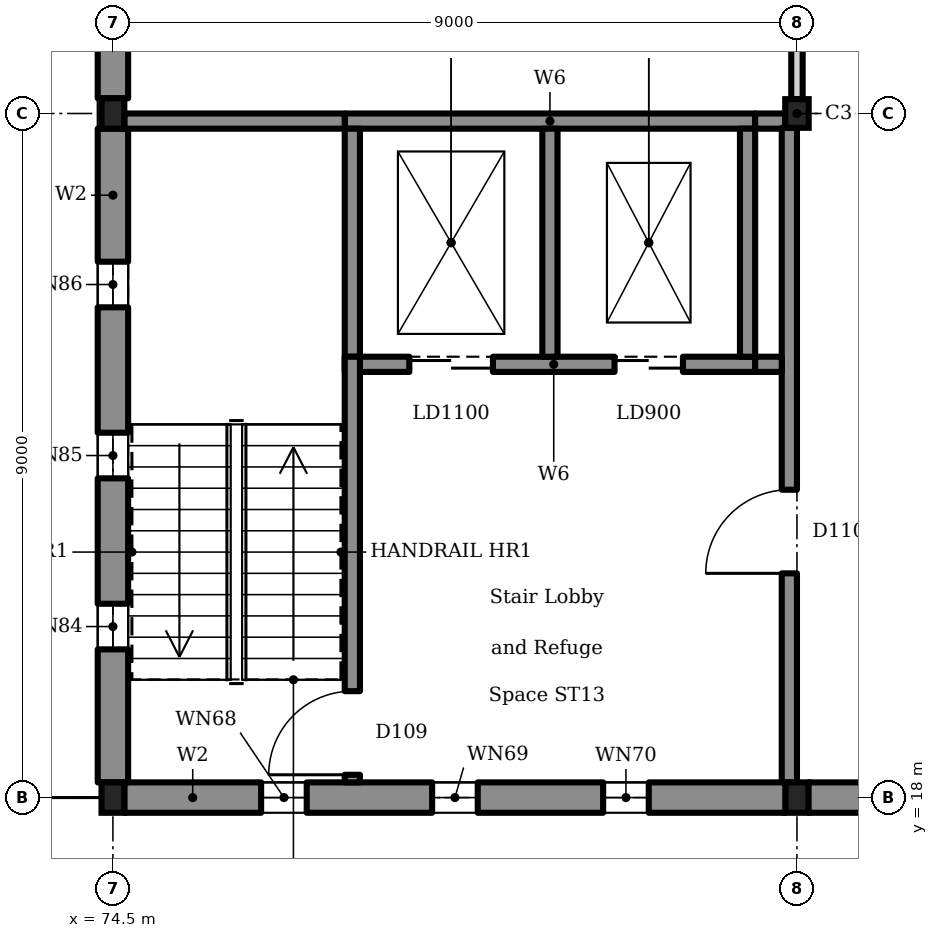
"""IFC4 building model, lengths in metres.
Left out: names, types, materials, properties, quantities, classifications, styles, units other than length and angle.
Written with IfcOpenShell. Run it as: python <this file> out.ifc"""

import sys

from ifc_helpers import new_model, si_unit, direction, frame, frame_2d, origin, origin_2d, place, context, subcontext, project, spatial, rectangle, i_section, extrude, element, fill, save


model = new_model("IFC4")
c1 = context("Model", 3, precision=1e-05, world=origin(), true_north=direction((0.0, 1.0)))
c2 = subcontext(c1, "Body", "Model", "MODEL_VIEW")
j1 = project(units=[si_unit("LENGTHUNIT", "METRE"), si_unit("PLANEANGLEUNIT", "RADIAN")], contexts=[c1])
p1 = place(None, origin())
s1 = spatial("IfcSite", under=j1, at=p1, CompositionType="ELEMENT")
p2 = place(p1, origin())
s2 = spatial("IfcBuilding", under=s1, at=p2, CompositionType="ELEMENT")
p3 = place(p2, frame((0.0, 0.0, 9.9)))
s3 = spatial("IfcBuildingStorey", under=s2, at=p3, CompositionType="ELEMENT", Elevation=9.9)
for number, where, z_axis, x_axis in (
    (1, (74.5, 18.0, 0.0), (0.0, 0.0, 1.0), (1.0, 0.0, 0.0)),
    (2, (83.5, 18.0, 0.0), (0.0, 0.0, 1.0), (1.0, 0.0, 0.0)),
    (3, (74.5, 27.0, 0.0), (0.0, 0.0, 1.0), (1.0, 0.0, 0.0)),
):
    element("IfcColumn", number, at=place(p3, frame(where, z_axis=z_axis, x_axis=x_axis)), inside=s3, PredefinedType="COLUMN", context=c2, shape_type="SweptSolid", body=[
        extrude(i_section(OverallWidth=0.3, OverallDepth=0.4, WebThickness=0.013, FlangeThickness=0.024, FilletRadius=0.027, at=origin_2d()), origin(), (0.0, 0.0, 1.0), 4.5),
    ])
p4 = place(p3, frame((83.5, 27.0, 0.0), z_axis=(0.0, 0.0, 1.0), x_axis=(1.0, 0.0, 0.0)))
e4 = element("IfcColumn", 4, at=p4, inside=s3, PredefinedType="COLUMN", context=c2, shape_type="SweptSolid", body=[
    extrude(i_section(OverallWidth=0.309, OverallDepth=0.377, WebThickness=0.021, FlangeThickness=0.04, FilletRadius=0.027, at=origin_2d()), origin(), (0.0, 0.0, 1.0), 4.5),
])
p5 = place(p3, frame((77.55, 23.7, 0.0), z_axis=(0.0, 0.0, 1.0), x_axis=(1.0, 0.0, 0.0)))
e5 = element("IfcWall", 5, at=p5, inside=s3, PredefinedType="SOLIDWALL", context=c2, shape_type="SweptSolid", body=[
    extrude(rectangle(XDim=5.4, YDim=0.2, at=frame_2d((2.7, 0.0))), origin(), (0.0, 0.0, 1.0), 4.25),
])
p6 = place(p5, frame((0.85, 0.0, 0.0)))
e6 = element("IfcOpeningElement", 6, at=p6, cuts=e5, PredefinedType="OPENING", context=c2, shape_type="SweptSolid", body=[
    extrude(rectangle(XDim=1.1, YDim=2.1, at=frame_2d((0.55, 1.05))), frame((0.0, 0.11, 0.0), z_axis=(0.0, -1.0, 0.0), x_axis=(1.0, 0.0, 0.0)), (0.0, 0.0, 1.0), 0.22),
])
p7 = place(p5, frame((3.55, 0.0, 0.0)))
e7 = element("IfcOpeningElement", 7, at=p7, cuts=e5, PredefinedType="OPENING", context=c2, shape_type="SweptSolid", body=[
    extrude(rectangle(XDim=0.9, YDim=2.1, at=frame_2d((0.45, 1.05))), frame((0.0, 0.11, 0.0), z_axis=(0.0, -1.0, 0.0), x_axis=(1.0, 0.0, 0.0)), (0.0, 0.0, 1.0), 0.22),
])
p8 = place(p3, frame((77.55, 26.9, 0.0), z_axis=(0.0, 0.0, 1.0), x_axis=(1.0, 0.0, 0.0)))
e8 = element("IfcWall", 8, at=p8, inside=s3, PredefinedType="SOLIDWALL", context=c2, shape_type="SweptSolid", body=[
    extrude(rectangle(XDim=5.4, YDim=0.2, at=frame_2d((2.7, 0.0))), origin(), (0.0, 0.0, 1.0), 4.25),
])
for number, where, z_axis, x_axis in (
    (9, (77.65, 23.8, 0.0), (0.0, 0.0, 1.0), (0.0, 1.0, 0.0)),
    (10, (80.25, 23.8, 0.0), (0.0, 0.0, 1.0), (0.0, 1.0, 0.0)),
    (11, (82.85, 23.8, 0.0), (0.0, 0.0, 1.0), (0.0, 1.0, 0.0)),
):
    element("IfcWall", number, at=place(p3, frame(where, z_axis=z_axis, x_axis=x_axis)), inside=s3, PredefinedType="SOLIDWALL", context=c2, shape_type="SweptSolid", body=[
        extrude(rectangle(XDim=3.0, YDim=0.2, at=frame_2d((1.5, 0.0))), origin(), (0.0, 0.0, 1.0), 4.25),
    ])
p9 = place(p3, frame((74.65, 18.0, 0.0), z_axis=(0.0, 0.0, 1.0), x_axis=(1.0, 0.0, 0.0)))
e12 = element("IfcWall", 12, at=p9, inside=s3, PredefinedType="SOLIDWALL", context=c2, shape_type="SweptSolid", body=[
    extrude(rectangle(XDim=8.7, YDim=0.4, at=frame_2d((4.35, 0.0))), origin(), (0.0, 0.0, 1.0), 4.5),
])
p10 = place(p9, frame((1.8, 0.0, 0.9)))
e13 = element("IfcOpeningElement", 13, at=p10, cuts=e12, PredefinedType="OPENING", context=c2, shape_type="SweptSolid", body=[
    extrude(rectangle(XDim=0.6, YDim=2.4, at=frame_2d((0.3, 1.2))), frame((0.0, 0.21, 0.0), z_axis=(0.0, -1.0, 0.0), x_axis=(1.0, 0.0, 0.0)), (0.0, 0.0, 1.0), 0.42),
])
p11 = place(p9, frame((4.05, 0.0, 0.9)))
e14 = element("IfcOpeningElement", 14, at=p11, cuts=e12, PredefinedType="OPENING", context=c2, shape_type="SweptSolid", body=[
    extrude(rectangle(XDim=0.6, YDim=2.4, at=frame_2d((0.3, 1.2))), frame((0.0, 0.21, 0.0), z_axis=(0.0, -1.0, 0.0), x_axis=(1.0, 0.0, 0.0)), (0.0, 0.0, 1.0), 0.42),
])
p12 = place(p9, frame((6.3, 0.0, 0.9)))
e15 = element("IfcOpeningElement", 15, at=p12, cuts=e12, PredefinedType="OPENING", context=c2, shape_type="SweptSolid", body=[
    extrude(rectangle(XDim=0.6, YDim=2.4, at=frame_2d((0.3, 1.2))), frame((0.0, 0.21, 0.0), z_axis=(0.0, -1.0, 0.0), x_axis=(1.0, 0.0, 0.0)), (0.0, 0.0, 1.0), 0.42),
])
p13 = place(p3, frame((83.65, 18.0, 0.0), z_axis=(0.0, 0.0, 1.0), x_axis=(1.0, 0.0, 0.0)))
e16 = element("IfcWall", 16, at=p13, inside=s3, PredefinedType="SOLIDWALL", context=c2, shape_type="SweptSolid", body=[
    extrude(rectangle(XDim=8.7, YDim=0.4, at=frame_2d((4.35, 0.0))), origin(), (0.0, 0.0, 1.0), 4.5),
])
p14 = place(p13, frame((4.125, 0.0, 0.9)))
e17 = element("IfcOpeningElement", 17, at=p14, cuts=e16, PredefinedType="OPENING", context=c2, shape_type="SweptSolid", body=[
    extrude(rectangle(XDim=0.45, YDim=2.6, at=frame_2d((0.225, 1.3))), frame((0.0, 0.21, 0.0), z_axis=(0.0, -1.0, 0.0), x_axis=(1.0, 0.0, 0.0)), (0.0, 0.0, 1.0), 0.42),
])
p15 = place(p13, frame((6.375, 0.0, 0.9)))
e18 = element("IfcOpeningElement", 18, at=p15, cuts=e16, PredefinedType="OPENING", context=c2, shape_type="SweptSolid", body=[
    extrude(rectangle(XDim=0.45, YDim=2.6, at=frame_2d((0.225, 1.3))), frame((0.0, 0.21, 0.0), z_axis=(0.0, -1.0, 0.0), x_axis=(1.0, 0.0, 0.0)), (0.0, 0.0, 1.0), 0.42),
])
p16 = place(p3, frame((74.5, 18.2, 0.0), z_axis=(0.0, 0.0, 1.0), x_axis=(0.0, 1.0, 0.0)))
e19 = element("IfcWall", 19, at=p16, inside=s3, PredefinedType="SOLIDWALL", context=c2, shape_type="SweptSolid", body=[
    extrude(rectangle(XDim=8.6, YDim=0.4, at=frame_2d((4.3, 0.0))), origin(), (0.0, 0.0, 1.0), 4.5),
])
p17 = place(p16, frame((1.75, 0.0, 0.9)))
e20 = element("IfcOpeningElement", 20, at=p17, cuts=e19, PredefinedType="OPENING", context=c2, shape_type="SweptSolid", body=[
    extrude(rectangle(XDim=0.6, YDim=2.4, at=frame_2d((0.3, 1.2))), frame((0.0, 0.21, 0.0), z_axis=(0.0, -1.0, 0.0), x_axis=(1.0, 0.0, 0.0)), (0.0, 0.0, 1.0), 0.42),
])
p18 = place(p16, frame((4.0, 0.0, 0.9)))
e21 = element("IfcOpeningElement", 21, at=p18, cuts=e19, PredefinedType="OPENING", context=c2, shape_type="SweptSolid", body=[
    extrude(rectangle(XDim=0.6, YDim=2.4, at=frame_2d((0.3, 1.2))), frame((0.0, 0.21, 0.0), z_axis=(0.0, -1.0, 0.0), x_axis=(1.0, 0.0, 0.0)), (0.0, 0.0, 1.0), 0.42),
])
p19 = place(p16, frame((6.25, 0.0, 0.9)))
e22 = element("IfcOpeningElement", 22, at=p19, cuts=e19, PredefinedType="OPENING", context=c2, shape_type="SweptSolid", body=[
    extrude(rectangle(XDim=0.6, YDim=2.4, at=frame_2d((0.3, 1.2))), frame((0.0, 0.21, 0.0), z_axis=(0.0, -1.0, 0.0), x_axis=(1.0, 0.0, 0.0)), (0.0, 0.0, 1.0), 0.42),
])
p20 = place(p3, frame((74.5, 27.2, 0.0), z_axis=(0.0, 0.0, 1.0), x_axis=(0.0, 1.0, 0.0)))
e23 = element("IfcWall", 23, at=p20, inside=s3, PredefinedType="SOLIDWALL", context=c2, shape_type="SweptSolid", body=[
    extrude(rectangle(XDim=8.6, YDim=0.4, at=frame_2d((4.3, 0.0))), origin(), (0.0, 0.0, 1.0), 4.5),
])
p21 = place(p20, frame((3.7, 0.0, 0.0)))
e24 = element("IfcOpeningElement", 24, at=p21, cuts=e23, PredefinedType="OPENING", context=c2, shape_type="SweptSolid", body=[
    extrude(rectangle(XDim=1.2, YDim=2.4, at=frame_2d((0.6, 1.2))), frame((0.0, 0.21, 0.0), z_axis=(0.0, -1.0, 0.0), x_axis=(1.0, 0.0, 0.0)), (0.0, 0.0, 1.0), 0.42),
])
p22 = place(p20, frame((1.15, 0.0, 0.9)))
e25 = element("IfcOpeningElement", 25, at=p22, cuts=e23, PredefinedType="OPENING", context=c2, shape_type="SweptSolid", body=[
    extrude(rectangle(XDim=1.8, YDim=2.1, at=frame_2d((0.9, 1.05))), frame((0.0, 0.21, 0.0), z_axis=(0.0, -1.0, 0.0), x_axis=(1.0, 0.0, 0.0)), (0.0, 0.0, 1.0), 0.42),
])
p23 = place(p20, frame((5.65, 0.0, 0.9)))
e26 = element("IfcOpeningElement", 26, at=p23, cuts=e23, PredefinedType="OPENING", context=c2, shape_type="SweptSolid", body=[
    extrude(rectangle(XDim=1.8, YDim=2.1, at=frame_2d((0.9, 1.05))), frame((0.0, 0.21, 0.0), z_axis=(0.0, -1.0, 0.0), x_axis=(1.0, 0.0, 0.0)), (0.0, 0.0, 1.0), 0.42),
])
p24 = place(p3, frame((74.65, 26.9, 0.0), z_axis=(0.0, 0.0, 1.0), x_axis=(1.0, 0.0, 0.0)))
e27 = element("IfcWall", 27, at=p24, inside=s3, PredefinedType="SOLIDWALL", context=c2, shape_type="SweptSolid", body=[
    extrude(rectangle(XDim=2.9, YDim=0.2, at=frame_2d((1.45, 0.0))), origin(), (0.0, 0.0, 1.0), 4.25),
])
p25 = place(p3, frame((82.95, 26.9, 0.0), z_axis=(0.0, 0.0, 1.0), x_axis=(1.0, 0.0, 0.0)))
e28 = element("IfcWall", 28, at=p25, inside=s3, PredefinedType="SOLIDWALL", context=c2, shape_type="SweptSolid", body=[
    extrude(rectangle(XDim=0.396, YDim=0.2, at=frame_2d((0.198, 0.0))), origin(), (0.0, 0.0, 1.0), 4.25),
])
p26 = place(p3, frame((83.4, 18.2, 0.0), z_axis=(0.0, 0.0, 1.0), x_axis=(0.0, 1.0, 0.0)))
e29 = element("IfcWall", 29, at=p26, inside=s3, PredefinedType="SOLIDWALL", context=c2, shape_type="SweptSolid", body=[
    extrude(rectangle(XDim=8.612, YDim=0.2, at=frame_2d((4.306, 0.0))), origin(), (0.0, 0.0, 1.0), 4.25),
])
p27 = place(p26, frame((2.75, 0.0, 0.0)))
e30 = element("IfcOpeningElement", 30, at=p27, cuts=e29, PredefinedType="OPENING", context=c2, shape_type="SweptSolid", body=[
    extrude(rectangle(XDim=1.1, YDim=2.1, at=frame_2d((0.55, 1.05))), frame((0.0, 0.11, 0.0), z_axis=(0.0, -1.0, 0.0), x_axis=(1.0, 0.0, 0.0)), (0.0, 0.0, 1.0), 0.22),
])
p28 = place(p3, frame((77.65, 18.2, 0.0), z_axis=(0.0, 0.0, 1.0), x_axis=(0.0, 1.0, 0.0)))
e31 = element("IfcWall", 31, at=p28, inside=s3, PredefinedType="SOLIDWALL", context=c2, shape_type="SweptSolid", body=[
    extrude(rectangle(XDim=5.6, YDim=0.2, at=frame_2d((2.8, 0.0))), origin(), (0.0, 0.0, 1.0), 4.25),
])
p29 = place(p28, frame((0.1, 0.0, 0.0)))
e32 = element("IfcOpeningElement", 32, at=p29, cuts=e31, PredefinedType="OPENING", context=c2, shape_type="SweptSolid", body=[
    extrude(rectangle(XDim=1.1, YDim=2.1, at=frame_2d((0.55, 1.05))), frame((0.0, 0.11, 0.0), z_axis=(0.0, -1.0, 0.0), x_axis=(1.0, 0.0, 0.0)), (0.0, 0.0, 1.0), 0.22),
])
p30 = place(p3, frame((82.95, 23.7, 0.0), z_axis=(0.0, 0.0, 1.0), x_axis=(1.0, 0.0, 0.0)))
e33 = element("IfcWall", 33, at=p30, inside=s3, PredefinedType="SOLIDWALL", context=c2, shape_type="SweptSolid", body=[
    extrude(rectangle(XDim=0.35, YDim=0.2, at=frame_2d((0.175, 0.0))), origin(), (0.0, 0.0, 1.0), 4.25),
])
p31 = place(p3, frame((83.5, 27.188, 0.0), z_axis=(0.0, 0.0, 1.0), x_axis=(0.0, 1.0, 0.0)))
e34 = element("IfcWall", 34, at=p31, inside=s3, PredefinedType="PARTITIONING", context=c2, shape_type="SweptSolid", body=[
    extrude(rectangle(XDim=8.623, YDim=0.15, at=frame_2d((4.312, 0.0))), origin(), (0.0, 0.0, 1.0), 3.6),
])
p32 = place(p31, frame((3.812, 0.0, 0.0)))
e35 = element("IfcOpeningElement", 35, at=p32, cuts=e34, PredefinedType="OPENING", context=c2, shape_type="SweptSolid", body=[
    extrude(rectangle(XDim=1.0, YDim=2.1, at=frame_2d((0.5, 1.05))), frame((0.0, 0.085, 0.0), z_axis=(0.0, -1.0, 0.0), x_axis=(1.0, 0.0, 0.0)), (0.0, 0.0, 1.0), 0.17),
])
p33 = place(p6, origin())
e36 = element("IfcDoor", 36, at=p33, inside=s3, OperationType="SLIDING_TO_LEFT", PredefinedType="DOOR", context=c2, shape_type="SweptSolid", body=[
    extrude(rectangle(XDim=1.1, YDim=2.1, at=frame_2d((0.55, 1.05))), frame((0.0, 0.025, 0.0), z_axis=(0.0, -1.0, 0.0), x_axis=(1.0, 0.0, 0.0)), (0.0, 0.0, 1.0), 0.05),
])
fill(e6, e36)
p34 = place(p7, origin())
e37 = element("IfcDoor", 37, at=p34, inside=s3, OperationType="SLIDING_TO_LEFT", PredefinedType="DOOR", context=c2, shape_type="SweptSolid", body=[
    extrude(rectangle(XDim=0.9, YDim=2.1, at=frame_2d((0.45, 1.05))), frame((0.0, 0.025, 0.0), z_axis=(0.0, -1.0, 0.0), x_axis=(1.0, 0.0, 0.0)), (0.0, 0.0, 1.0), 0.05),
])
fill(e7, e37)
p35 = place(p10, origin())
e38 = element("IfcWindow", 38, at=p35, inside=s3, PartitioningType="SINGLE_PANEL", PredefinedType="WINDOW", context=c2, shape_type="SweptSolid", body=[
    extrude(rectangle(XDim=0.6, YDim=2.4, at=frame_2d((0.3, 1.2))), frame((0.0, 0.03, 0.0), z_axis=(0.0, -1.0, 0.0), x_axis=(1.0, 0.0, 0.0)), (0.0, 0.0, 1.0), 0.06),
])
fill(e13, e38)
p36 = place(p11, origin())
e39 = element("IfcWindow", 39, at=p36, inside=s3, PartitioningType="SINGLE_PANEL", PredefinedType="WINDOW", context=c2, shape_type="SweptSolid", body=[
    extrude(rectangle(XDim=0.6, YDim=2.4, at=frame_2d((0.3, 1.2))), frame((0.0, 0.03, 0.0), z_axis=(0.0, -1.0, 0.0), x_axis=(1.0, 0.0, 0.0)), (0.0, 0.0, 1.0), 0.06),
])
fill(e14, e39)
p37 = place(p12, origin())
e40 = element("IfcWindow", 40, at=p37, inside=s3, PartitioningType="SINGLE_PANEL", PredefinedType="WINDOW", context=c2, shape_type="SweptSolid", body=[
    extrude(rectangle(XDim=0.6, YDim=2.4, at=frame_2d((0.3, 1.2))), frame((0.0, 0.03, 0.0), z_axis=(0.0, -1.0, 0.0), x_axis=(1.0, 0.0, 0.0)), (0.0, 0.0, 1.0), 0.06),
])
fill(e15, e40)
p38 = place(p17, origin())
e41 = element("IfcWindow", 41, at=p38, inside=s3, PartitioningType="SINGLE_PANEL", PredefinedType="WINDOW", context=c2, shape_type="SweptSolid", body=[
    extrude(rectangle(XDim=0.6, YDim=2.4, at=frame_2d((0.3, 1.2))), frame((0.0, 0.03, 0.0), z_axis=(0.0, -1.0, 0.0), x_axis=(1.0, 0.0, 0.0)), (0.0, 0.0, 1.0), 0.06),
])
fill(e20, e41)
p39 = place(p18, origin())
e42 = element("IfcWindow", 42, at=p39, inside=s3, PartitioningType="SINGLE_PANEL", PredefinedType="WINDOW", context=c2, shape_type="SweptSolid", body=[
    extrude(rectangle(XDim=0.6, YDim=2.4, at=frame_2d((0.3, 1.2))), frame((0.0, 0.03, 0.0), z_axis=(0.0, -1.0, 0.0), x_axis=(1.0, 0.0, 0.0)), (0.0, 0.0, 1.0), 0.06),
])
fill(e21, e42)
p40 = place(p19, origin())
e43 = element("IfcWindow", 43, at=p40, inside=s3, PartitioningType="SINGLE_PANEL", PredefinedType="WINDOW", context=c2, shape_type="SweptSolid", body=[
    extrude(rectangle(XDim=0.6, YDim=2.4, at=frame_2d((0.3, 1.2))), frame((0.0, 0.03, 0.0), z_axis=(0.0, -1.0, 0.0), x_axis=(1.0, 0.0, 0.0)), (0.0, 0.0, 1.0), 0.06),
])
fill(e22, e43)
p41 = place(p29, origin())
e44 = element("IfcDoor", 44, at=p41, inside=s3, OperationType="SINGLE_SWING_RIGHT", PredefinedType="DOOR", context=c2, shape_type="SweptSolid", body=[
    extrude(rectangle(XDim=1.1, YDim=2.1, at=frame_2d((0.55, 1.05))), frame((0.0, 0.025, 0.0), z_axis=(0.0, -1.0, 0.0), x_axis=(1.0, 0.0, 0.0)), (0.0, 0.0, 1.0), 0.05),
])
fill(e32, e44)
p42 = place(p27, origin())
e45 = element("IfcDoor", 45, at=p42, inside=s3, OperationType="SINGLE_SWING_RIGHT", PredefinedType="DOOR", context=c2, shape_type="SweptSolid", body=[
    extrude(rectangle(XDim=1.1, YDim=2.1, at=frame_2d((0.55, 1.05))), frame((0.0, 0.025, 0.0), z_axis=(0.0, -1.0, 0.0), x_axis=(1.0, 0.0, 0.0)), (0.0, 0.0, 1.0), 0.05),
])
fill(e30, e45)
save(model, sys.argv[1])
